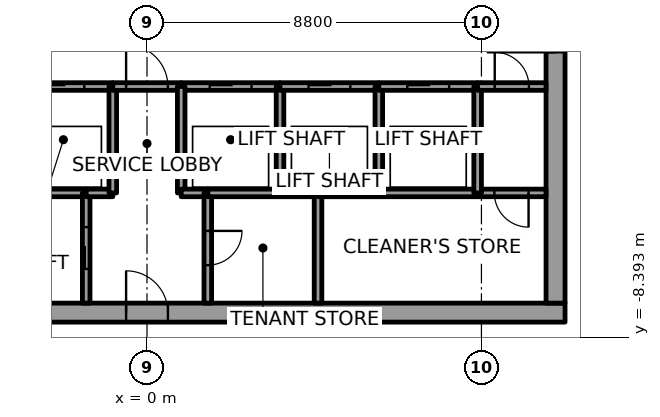
"""IFC4 building model, lengths in metres.
Left out: names, types, materials, properties, quantities, classifications, styles, units other than length and angle.
Written with IfcOpenShell. Run it as: python <this file> out.ifc"""

import sys

from ifc_helpers import new_model, si_unit, direction, frame, frame_2d, origin, place, context, subcontext, project, spatial, rectangle, extrude, element, fill, save


model = new_model("IFC4")
c1 = context("Model", 3, precision=1e-05, world=origin(), true_north=direction((0.0, 1.0)))
c2 = subcontext(c1, "Body", "Model", "MODEL_VIEW")
j1 = project(units=[si_unit("LENGTHUNIT", "METRE"), si_unit("PLANEANGLEUNIT", "RADIAN")], contexts=[c1])
p1 = place(None, origin())
s1 = spatial("IfcSite", under=j1, at=p1, CompositionType="ELEMENT")
p2 = place(p1, origin())
s2 = spatial("IfcBuilding", under=s1, at=p2, CompositionType="ELEMENT")
p3 = place(p2, frame((0.0, 0.0, 149.8)))
s3 = spatial("IfcBuildingStorey", under=s2, at=p3, CompositionType="ELEMENT", Elevation=149.8)
p4 = place(p3, frame((-11.0, -7.75, 0.0), z_axis=(0.0, 0.0, 1.0), x_axis=(1.0, 0.0, 0.0)))
e1 = element("IfcWall", 1, at=p4, inside=s3, PredefinedType="SHEAR", context=c2, shape_type="SweptSolid", body=[
    extrude(rectangle(XDim=22.0, YDim=0.5, at=frame_2d((11.0, 0.0))), origin(), (0.0, 0.0, 1.0), 4.0),
])
p5 = place(p4, frame((10.45, 0.0, 0.0)))
e2 = element("IfcOpeningElement", 2, at=p5, cuts=e1, PredefinedType="OPENING", context=c2, shape_type="SweptSolid", body=[
    extrude(rectangle(XDim=1.1, YDim=2.1, at=frame_2d((0.55, 1.05))), frame((0.0, 0.25, 0.0), z_axis=(0.0, -1.0, 0.0), x_axis=(1.0, 0.0, 0.0)), (0.0, 0.0, 1.0), 0.5),
])
p6 = place(p3, frame((10.75, -7.5, 0.0), z_axis=(0.0, 0.0, 1.0), x_axis=(0.0, 1.0, 0.0)))
e3 = element("IfcWall", 3, at=p6, inside=s3, PredefinedType="SHEAR", context=c2, shape_type="SweptSolid", body=[
    extrude(rectangle(XDim=15.0, YDim=0.5, at=frame_2d((7.5, 0.0))), origin(), (0.0, 0.0, 1.0), 4.0),
])
p7 = place(p6, frame((6.6, 0.0, 0.0)))
e4 = element("IfcOpeningElement", 4, at=p7, cuts=e3, PredefinedType="OPENING", context=c2, shape_type="SweptSolid", body=[
    extrude(rectangle(XDim=1.8, YDim=2.1, at=frame_2d((0.9, 1.05))), frame((0.0, 0.25, 0.0), z_axis=(0.0, -1.0, 0.0), x_axis=(1.0, 0.0, 0.0)), (0.0, 0.0, 1.0), 0.5),
])
p8 = place(p3, frame((-3.5, -4.6, 0.0), z_axis=(0.0, 0.0, 1.0), x_axis=(1.0, 0.0, 0.0)))
e5 = element("IfcWall", 5, at=p8, inside=s3, PredefinedType="SOLIDWALL", context=c2, shape_type="SweptSolid", body=[
    extrude(rectangle(XDim=1.9, YDim=0.2, at=frame_2d((0.95, 0.0))), origin(), (0.0, 0.0, 1.0), 3.85),
])
p9 = place(p3, frame((-3.5, -1.8, 0.0), z_axis=(0.0, 0.0, 1.0), x_axis=(1.0, 0.0, 0.0)))
e6 = element("IfcWall", 6, at=p9, inside=s3, PredefinedType="SOLIDWALL", context=c2, shape_type="SweptSolid", body=[
    extrude(rectangle(XDim=2.6, YDim=0.2, at=frame_2d((1.3, 0.0))), origin(), (0.0, 0.0, 1.0), 3.85),
])
p10 = place(p9, frame((0.75, 0.0, 0.0)))
e7 = element("IfcOpeningElement", 7, at=p10, cuts=e6, PredefinedType="OPENING", context=c2, shape_type="SweptSolid", body=[
    extrude(rectangle(XDim=1.1, YDim=2.1, at=frame_2d((0.55, 1.05))), frame((0.0, 0.1, 0.0), z_axis=(0.0, -1.0, 0.0), x_axis=(1.0, 0.0, 0.0)), (0.0, 0.0, 1.0), 0.2),
])
p11 = place(p3, frame((-1.6, -7.5, 0.0), z_axis=(0.0, 0.0, 1.0), x_axis=(0.0, 1.0, 0.0)))
e8 = element("IfcWall", 8, at=p11, inside=s3, PredefinedType="SOLIDWALL", context=c2, shape_type="SweptSolid", body=[
    extrude(rectangle(XDim=2.9, YDim=0.2, at=frame_2d((1.45, 0.0))), origin(), (0.0, 0.0, 1.0), 3.85),
])
p12 = place(p11, frame((0.9, 0.0, 0.0)))
e9 = element("IfcOpeningElement", 9, at=p12, cuts=e8, PredefinedType="OPENING", context=c2, shape_type="SweptSolid", body=[
    extrude(rectangle(XDim=1.1, YDim=2.1, at=frame_2d((0.55, 1.05))), frame((0.0, 0.1, 0.0), z_axis=(0.0, -1.0, 0.0), x_axis=(1.0, 0.0, 0.0)), (0.0, 0.0, 1.0), 0.2),
])
p13 = place(p3, frame((-1.6, -4.6, 0.0), z_axis=(0.0, 0.0, 1.0), x_axis=(1.0, 0.0, 0.0)))
e10 = element("IfcWall", 10, at=p13, inside=s3, PredefinedType="SOLIDWALL", context=c2, shape_type="SweptSolid", body=[
    extrude(rectangle(XDim=0.7, YDim=0.2, at=frame_2d((0.35, 0.0))), origin(), (0.0, 0.0, 1.0), 3.85),
])
p14 = place(p3, frame((-0.9, -4.6, 0.0), z_axis=(0.0, 0.0, 1.0), x_axis=(0.0, 1.0, 0.0)))
e11 = element("IfcWall", 11, at=p14, inside=s3, PredefinedType="SOLIDWALL", context=c2, shape_type="SweptSolid", body=[
    extrude(rectangle(XDim=2.8, YDim=0.2, at=frame_2d((1.4, 0.0))), origin(), (0.0, 0.0, 1.0), 3.85),
])
p15 = place(p3, frame((-0.9, -1.8, 0.0), z_axis=(0.0, 0.0, 1.0), x_axis=(1.0, 0.0, 0.0)))
e12 = element("IfcWall", 12, at=p15, inside=s3, PredefinedType="SOLIDWALL", context=c2, shape_type="SweptSolid", body=[
    extrude(rectangle(XDim=1.8, YDim=0.2, at=frame_2d((0.9, 0.0))), origin(), (0.0, 0.0, 1.0), 3.85),
])
p16 = place(p15, frame((0.35, 0.0, 0.0)))
e13 = element("IfcOpeningElement", 13, at=p16, cuts=e12, PredefinedType="OPENING", context=c2, shape_type="SweptSolid", body=[
    extrude(rectangle(XDim=1.1, YDim=2.1, at=frame_2d((0.55, 1.05))), frame((0.0, 0.1, 0.0), z_axis=(0.0, -1.0, 0.0), x_axis=(1.0, 0.0, 0.0)), (0.0, 0.0, 1.0), 0.2),
])
p17 = place(p3, frame((0.9, -1.8, 0.0), z_axis=(0.0, 0.0, 1.0), x_axis=(1.0, 0.0, 0.0)))
e14 = element("IfcWall", 14, at=p17, inside=s3, PredefinedType="SOLIDWALL", context=c2, shape_type="SweptSolid", body=[
    extrude(rectangle(XDim=2.6, YDim=0.2, at=frame_2d((1.3, 0.0))), origin(), (0.0, 0.0, 1.0), 3.85),
])
p18 = place(p17, frame((0.75, 0.0, 0.0)))
e15 = element("IfcOpeningElement", 15, at=p18, cuts=e14, PredefinedType="OPENING", context=c2, shape_type="SweptSolid", body=[
    extrude(rectangle(XDim=1.1, YDim=2.1, at=frame_2d((0.55, 1.05))), frame((0.0, 0.1, 0.0), z_axis=(0.0, -1.0, 0.0), x_axis=(1.0, 0.0, 0.0)), (0.0, 0.0, 1.0), 0.2),
])
p19 = place(p3, frame((0.9, -1.8, 0.0), z_axis=(0.0, 0.0, 1.0), x_axis=(0.0, -1.0, 0.0)))
e16 = element("IfcWall", 16, at=p19, inside=s3, PredefinedType="SOLIDWALL", context=c2, shape_type="SweptSolid", body=[
    extrude(rectangle(XDim=2.8, YDim=0.2, at=frame_2d((1.4, 0.0))), origin(), (0.0, 0.0, 1.0), 3.85),
])
p20 = place(p3, frame((0.9, -4.6, 0.0), z_axis=(0.0, 0.0, 1.0), x_axis=(1.0, 0.0, 0.0)))
e17 = element("IfcWall", 17, at=p20, inside=s3, PredefinedType="SOLIDWALL", context=c2, shape_type="SweptSolid", body=[
    extrude(rectangle(XDim=0.7, YDim=0.2, at=frame_2d((0.35, 0.0))), origin(), (0.0, 0.0, 1.0), 3.85),
])
p21 = place(p3, frame((1.6, -4.6, 0.0), z_axis=(0.0, 0.0, 1.0), x_axis=(0.0, -1.0, 0.0)))
e18 = element("IfcWall", 18, at=p21, inside=s3, PredefinedType="SOLIDWALL", context=c2, shape_type="SweptSolid", body=[
    extrude(rectangle(XDim=2.9, YDim=0.2, at=frame_2d((1.45, 0.0))), origin(), (0.0, 0.0, 1.0), 3.85),
])
p22 = place(p21, frame((1.0, 0.0, 0.0)))
e19 = element("IfcOpeningElement", 19, at=p22, cuts=e18, PredefinedType="OPENING", context=c2, shape_type="SweptSolid", body=[
    extrude(rectangle(XDim=0.9, YDim=2.1, at=frame_2d((0.45, 1.05))), frame((0.0, 0.1, 0.0), z_axis=(0.0, -1.0, 0.0), x_axis=(1.0, 0.0, 0.0)), (0.0, 0.0, 1.0), 0.2),
])
p23 = place(p3, frame((3.5, -4.6, 0.0), z_axis=(0.0, 0.0, 1.0), x_axis=(-1.0, 0.0, 0.0)))
e20 = element("IfcWall", 20, at=p23, inside=s3, PredefinedType="SOLIDWALL", context=c2, shape_type="SweptSolid", body=[
    extrude(rectangle(XDim=1.9, YDim=0.2, at=frame_2d((0.95, 0.0))), origin(), (0.0, 0.0, 1.0), 3.85),
])
p24 = place(p3, frame((4.5, -4.6, 0.0), z_axis=(0.0, 0.0, 1.0), x_axis=(-1.0, 0.0, 0.0)))
e21 = element("IfcWall", 21, at=p24, inside=s3, PredefinedType="SOLIDWALL", context=c2, shape_type="SweptSolid", body=[
    extrude(rectangle(XDim=1.0, YDim=0.2, at=frame_2d((0.5, 0.0))), origin(), (0.0, 0.0, 1.0), 3.85),
])
p25 = place(p3, frame((3.5, -4.6, 0.0), z_axis=(0.0, 0.0, 1.0), x_axis=(0.0, 1.0, 0.0)))
e22 = element("IfcWall", 22, at=p25, inside=s3, PredefinedType="SOLIDWALL", context=c2, shape_type="SweptSolid", body=[
    extrude(rectangle(XDim=2.8, YDim=0.2, at=frame_2d((1.4, 0.0))), origin(), (0.0, 0.0, 1.0), 3.85),
])
p26 = place(p3, frame((3.5, -1.8, 0.0), z_axis=(0.0, 0.0, 1.0), x_axis=(1.0, 0.0, 0.0)))
e23 = element("IfcWall", 23, at=p26, inside=s3, PredefinedType="SOLIDWALL", context=c2, shape_type="SweptSolid", body=[
    extrude(rectangle(XDim=2.6, YDim=0.2, at=frame_2d((1.3, 0.0))), origin(), (0.0, 0.0, 1.0), 3.85),
])
p27 = place(p26, frame((0.75, 0.0, 0.0)))
e24 = element("IfcOpeningElement", 24, at=p27, cuts=e23, PredefinedType="OPENING", context=c2, shape_type="SweptSolid", body=[
    extrude(rectangle(XDim=1.1, YDim=2.1, at=frame_2d((0.55, 1.05))), frame((0.0, 0.1, 0.0), z_axis=(0.0, -1.0, 0.0), x_axis=(1.0, 0.0, 0.0)), (0.0, 0.0, 1.0), 0.2),
])
p28 = place(p3, frame((4.5, -4.6, 0.0), z_axis=(0.0, 0.0, 1.0), x_axis=(0.0, -1.0, 0.0)))
e25 = element("IfcWall", 25, at=p28, inside=s3, PredefinedType="SOLIDWALL", context=c2, shape_type="SweptSolid", body=[
    extrude(rectangle(XDim=2.9, YDim=0.2, at=frame_2d((1.45, 0.0))), origin(), (0.0, 0.0, 1.0), 3.85),
])
p29 = place(p3, frame((6.1, -4.6, 0.0), z_axis=(0.0, 0.0, 1.0), x_axis=(-1.0, 0.0, 0.0)))
e26 = element("IfcWall", 26, at=p29, inside=s3, PredefinedType="SOLIDWALL", context=c2, shape_type="SweptSolid", body=[
    extrude(rectangle(XDim=1.6, YDim=0.2, at=frame_2d((0.8, 0.0))), origin(), (0.0, 0.0, 1.0), 3.85),
])
p30 = place(p3, frame((8.7, -4.6, 0.0), z_axis=(0.0, 0.0, 1.0), x_axis=(-1.0, 0.0, 0.0)))
e27 = element("IfcWall", 27, at=p30, inside=s3, PredefinedType="SOLIDWALL", context=c2, shape_type="SweptSolid", body=[
    extrude(rectangle(XDim=2.6, YDim=0.2, at=frame_2d((1.3, 0.0))), origin(), (0.0, 0.0, 1.0), 3.85),
])
p31 = place(p3, frame((6.1, -4.6, 0.0), z_axis=(0.0, 0.0, 1.0), x_axis=(0.0, 1.0, 0.0)))
e28 = element("IfcWall", 28, at=p31, inside=s3, PredefinedType="SOLIDWALL", context=c2, shape_type="SweptSolid", body=[
    extrude(rectangle(XDim=2.8, YDim=0.2, at=frame_2d((1.4, 0.0))), origin(), (0.0, 0.0, 1.0), 3.85),
])
p32 = place(p3, frame((6.1, -1.8, 0.0), z_axis=(0.0, 0.0, 1.0), x_axis=(1.0, 0.0, 0.0)))
e29 = element("IfcWall", 29, at=p32, inside=s3, PredefinedType="SOLIDWALL", context=c2, shape_type="SweptSolid", body=[
    extrude(rectangle(XDim=2.6, YDim=0.2, at=frame_2d((1.3, 0.0))), origin(), (0.0, 0.0, 1.0), 3.85),
])
p33 = place(p32, frame((0.75, 0.0, 0.0)))
e30 = element("IfcOpeningElement", 30, at=p33, cuts=e29, PredefinedType="OPENING", context=c2, shape_type="SweptSolid", body=[
    extrude(rectangle(XDim=1.1, YDim=2.1, at=frame_2d((0.55, 1.05))), frame((0.0, 0.1, 0.0), z_axis=(0.0, -1.0, 0.0), x_axis=(1.0, 0.0, 0.0)), (0.0, 0.0, 1.0), 0.2),
])
p34 = place(p3, frame((10.5, -4.6, 0.0), z_axis=(0.0, 0.0, 1.0), x_axis=(-1.0, 0.0, 0.0)))
e31 = element("IfcWall", 31, at=p34, inside=s3, PredefinedType="SOLIDWALL", context=c2, shape_type="SweptSolid", body=[
    extrude(rectangle(XDim=1.8, YDim=0.2, at=frame_2d((0.9, 0.0))), origin(), (0.0, 0.0, 1.0), 3.85),
])
p35 = place(p34, frame((0.46, 0.0, 0.0)))
e32 = element("IfcOpeningElement", 32, at=p35, cuts=e31, PredefinedType="OPENING", context=c2, shape_type="SweptSolid", body=[
    extrude(rectangle(XDim=0.9, YDim=2.1, at=frame_2d((0.45, 1.05))), frame((0.0, 0.1, 0.0), z_axis=(0.0, -1.0, 0.0), x_axis=(1.0, 0.0, 0.0)), (0.0, 0.0, 1.0), 0.2),
])
p36 = place(p3, frame((8.7, -1.8, 0.0), z_axis=(0.0, 0.0, 1.0), x_axis=(0.0, -1.0, 0.0)))
e33 = element("IfcWall", 33, at=p36, inside=s3, PredefinedType="SOLIDWALL", context=c2, shape_type="SweptSolid", body=[
    extrude(rectangle(XDim=2.8, YDim=0.2, at=frame_2d((1.4, 0.0))), origin(), (0.0, 0.0, 1.0), 3.85),
])
p37 = place(p3, frame((8.7, -1.8, 0.0), z_axis=(0.0, 0.0, 1.0), x_axis=(1.0, 0.0, 0.0)))
e34 = element("IfcWall", 34, at=p37, inside=s3, PredefinedType="SOLIDWALL", context=c2, shape_type="SweptSolid", body=[
    extrude(rectangle(XDim=1.8, YDim=0.2, at=frame_2d((0.9, 0.0))), origin(), (0.0, 0.0, 1.0), 3.85),
])
p38 = place(p37, frame((0.45, 0.0, 0.0)))
e35 = element("IfcOpeningElement", 35, at=p38, cuts=e34, PredefinedType="OPENING", context=c2, shape_type="SweptSolid", body=[
    extrude(rectangle(XDim=0.9, YDim=2.1, at=frame_2d((0.45, 1.05))), frame((0.0, 0.1, 0.0), z_axis=(0.0, -1.0, 0.0), x_axis=(1.0, 0.0, 0.0)), (0.0, 0.0, 1.0), 0.2),
])
p39 = place(p10, origin())
e36 = element("IfcDoor", 36, at=p39, inside=s3, OperationType="SLIDING_TO_LEFT", PredefinedType="DOOR", context=c2, shape_type="SweptSolid", body=[
    extrude(rectangle(XDim=1.1, YDim=2.1, at=frame_2d((0.55, 1.05))), frame((0.0, 0.025, 0.0), z_axis=(0.0, -1.0, 0.0), x_axis=(1.0, 0.0, 0.0)), (0.0, 0.0, 1.0), 0.05),
])
fill(e7, e36)
p40 = place(p18, origin())
e37 = element("IfcDoor", 37, at=p40, inside=s3, OperationType="SLIDING_TO_LEFT", PredefinedType="DOOR", context=c2, shape_type="SweptSolid", body=[
    extrude(rectangle(XDim=1.1, YDim=2.1, at=frame_2d((0.55, 1.05))), frame((0.0, 0.025, 0.0), z_axis=(0.0, -1.0, 0.0), x_axis=(1.0, 0.0, 0.0)), (0.0, 0.0, 1.0), 0.05),
])
fill(e15, e37)
p41 = place(p27, origin())
e38 = element("IfcDoor", 38, at=p41, inside=s3, OperationType="SLIDING_TO_RIGHT", PredefinedType="DOOR", context=c2, shape_type="SweptSolid", body=[
    extrude(rectangle(XDim=1.1, YDim=2.1, at=frame_2d((0.55, 1.05))), frame((0.0, 0.025, 0.0), z_axis=(0.0, -1.0, 0.0), x_axis=(1.0, 0.0, 0.0)), (0.0, 0.0, 1.0), 0.05),
])
fill(e24, e38)
p42 = place(p33, origin())
e39 = element("IfcDoor", 39, at=p42, inside=s3, OperationType="SLIDING_TO_RIGHT", PredefinedType="DOOR", context=c2, shape_type="SweptSolid", body=[
    extrude(rectangle(XDim=1.1, YDim=2.1, at=frame_2d((0.55, 1.05))), frame((0.0, 0.025, 0.0), z_axis=(0.0, -1.0, 0.0), x_axis=(1.0, 0.0, 0.0)), (0.0, 0.0, 1.0), 0.05),
])
fill(e30, e39)
p43 = place(p12, origin())
e40 = element("IfcDoor", 40, at=p43, inside=s3, OperationType="SLIDING_TO_RIGHT", PredefinedType="DOOR", context=c2, shape_type="SweptSolid", body=[
    extrude(rectangle(XDim=1.1, YDim=2.1, at=frame_2d((0.55, 1.05))), frame((0.0, 0.025, 0.0), z_axis=(0.0, -1.0, 0.0), x_axis=(1.0, 0.0, 0.0)), (0.0, 0.0, 1.0), 0.05),
])
fill(e9, e40)
p44 = place(p16, origin())
e41 = element("IfcDoor", 41, at=p44, inside=s3, OperationType="SINGLE_SWING_LEFT", PredefinedType="DOOR", context=c2, shape_type="SweptSolid", body=[
    extrude(rectangle(XDim=1.1, YDim=2.1, at=frame_2d((0.55, 1.05))), frame((0.0, 0.025, 0.0), z_axis=(0.0, -1.0, 0.0), x_axis=(1.0, 0.0, 0.0)), (0.0, 0.0, 1.0), 0.05),
])
fill(e13, e41)
p45 = place(p35, origin())
e42 = element("IfcDoor", 42, at=p45, inside=s3, OperationType="SINGLE_SWING_LEFT", PredefinedType="DOOR", context=c2, shape_type="SweptSolid", body=[
    extrude(rectangle(XDim=0.9, YDim=2.1, at=frame_2d((0.45, 1.05))), frame((0.0, 0.025, 0.0), z_axis=(0.0, -1.0, 0.0), x_axis=(1.0, 0.0, 0.0)), (0.0, 0.0, 1.0), 0.05),
])
fill(e32, e42)
p46 = place(p38, origin())
e43 = element("IfcDoor", 43, at=p46, inside=s3, OperationType="SINGLE_SWING_LEFT", PredefinedType="DOOR", context=c2, shape_type="SweptSolid", body=[
    extrude(rectangle(XDim=0.9, YDim=2.1, at=frame_2d((0.45, 1.05))), frame((0.0, 0.025, 0.0), z_axis=(0.0, -1.0, 0.0), x_axis=(1.0, 0.0, 0.0)), (0.0, 0.0, 1.0), 0.05),
])
fill(e35, e43)
p47 = place(p22, origin())
e44 = element("IfcDoor", 44, at=p47, inside=s3, OperationType="SINGLE_SWING_RIGHT", PredefinedType="DOOR", context=c2, shape_type="SweptSolid", body=[
    extrude(rectangle(XDim=0.9, YDim=2.1, at=frame_2d((0.45, 1.05))), frame((0.0, 0.025, 0.0), z_axis=(0.0, -1.0, 0.0), x_axis=(1.0, 0.0, 0.0)), (0.0, 0.0, 1.0), 0.05),
])
fill(e19, e44)
p48 = place(p7, origin())
e45 = element("IfcDoor", 45, at=p48, inside=s3, OperationType="DOUBLE_DOOR_SINGLE_SWING", PredefinedType="DOOR", context=c2, shape_type="SweptSolid", body=[
    extrude(rectangle(XDim=1.8, YDim=2.1, at=frame_2d((0.9, 1.05))), frame((0.0, 0.025, 0.0), z_axis=(0.0, -1.0, 0.0), x_axis=(1.0, 0.0, 0.0)), (0.0, 0.0, 1.0), 0.05),
])
fill(e4, e45)
p49 = place(p5, origin())
e46 = element("IfcDoor", 46, at=p49, inside=s3, OperationType="SINGLE_SWING_LEFT", PredefinedType="DOOR", context=c2, shape_type="SweptSolid", body=[
    extrude(rectangle(XDim=1.1, YDim=2.1, at=frame_2d((0.55, 1.05))), frame((0.0, 0.025, 0.0), z_axis=(0.0, -1.0, 0.0), x_axis=(1.0, 0.0, 0.0)), (0.0, 0.0, 1.0), 0.05),
])
fill(e2, e46)
save(model, sys.argv[1])
